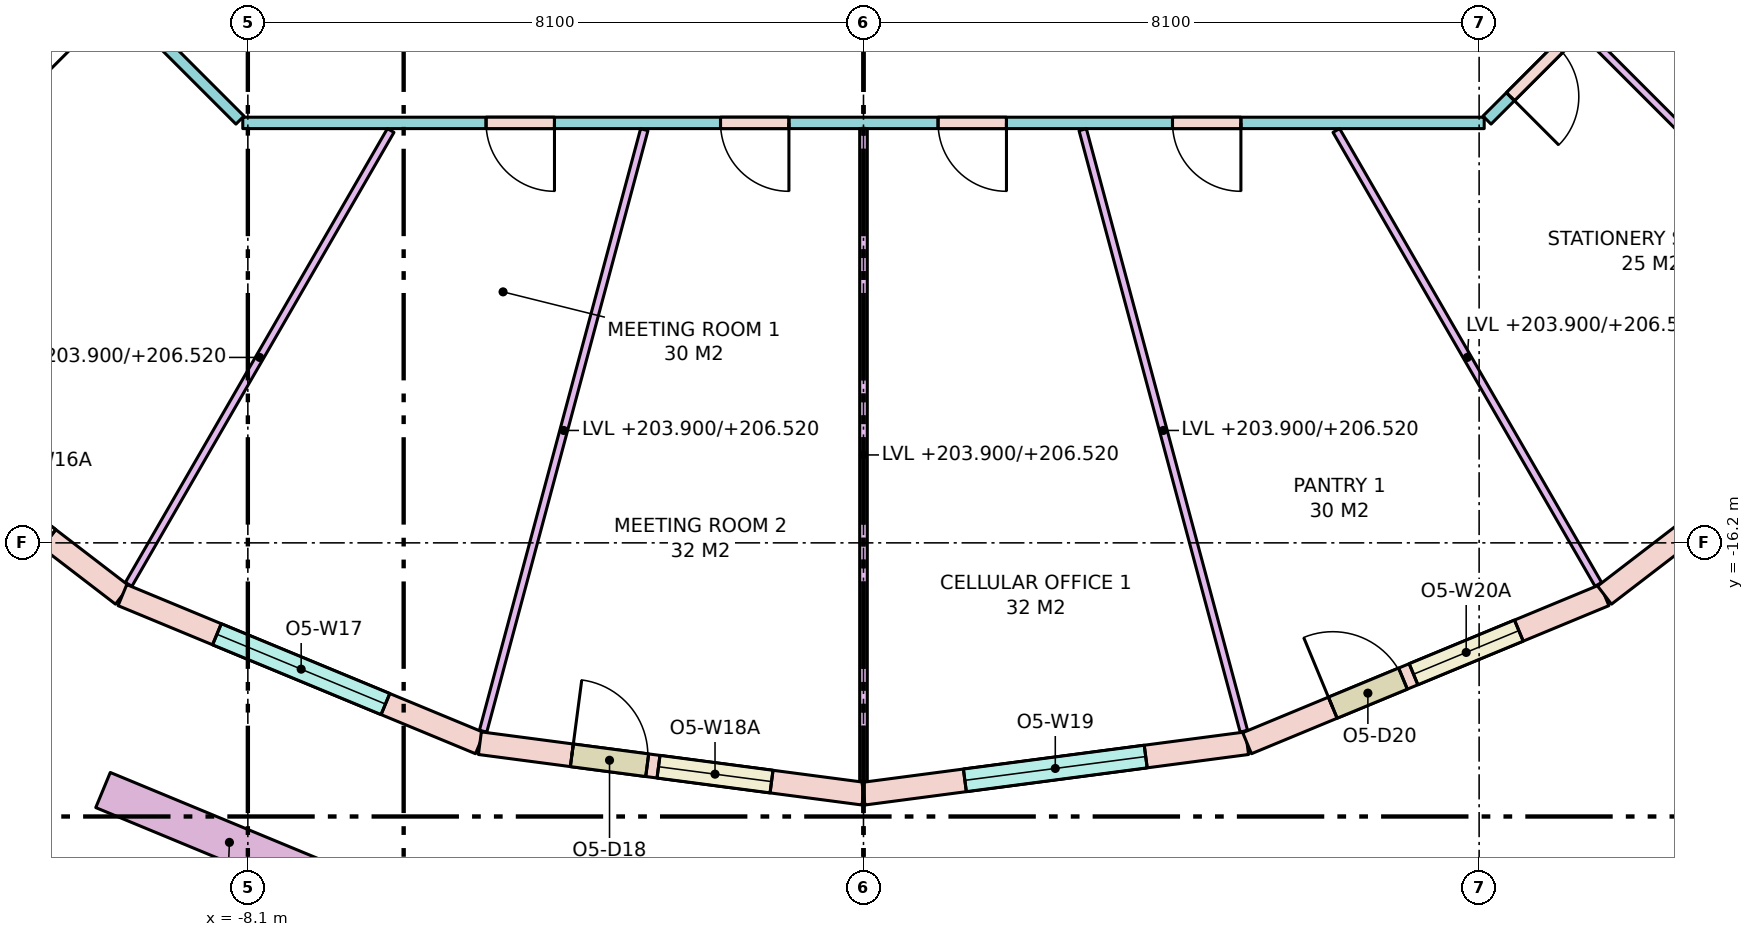
"""IFC4 building model, lengths in metres.
Left out: names, types, materials, properties, quantities, classifications, styles, units other than length and angle.
Written with IfcOpenShell. Run it as: python <this file> out.ifc"""

import sys

from ifc_helpers import new_model, si_unit, direction, frame, frame_2d, origin, place, context, subcontext, project, spatial, rectangle, extrude, element, fill, save


model = new_model("IFC4")
c1 = context("Model", 3, precision=1e-05, world=origin(), true_north=direction((0.0, 1.0)))
c2 = subcontext(c1, "Body", "Model", "MODEL_VIEW")
j1 = project(units=[si_unit("LENGTHUNIT", "METRE"), si_unit("PLANEANGLEUNIT", "RADIAN")], contexts=[c1])
p1 = place(None, origin())
s1 = spatial("IfcSite", under=j1, at=p1, CompositionType="ELEMENT")
p2 = place(p1, origin())
s2 = spatial("IfcBuilding", under=s1, at=p2, CompositionType="ELEMENT")
p3 = place(p2, frame((0.0, 0.0, 203.9)))
s3 = spatial("IfcBuildingStorey", under=s2, at=p3, CompositionType="ELEMENT", Elevation=203.9)
p4 = place(p3, frame((-13.789, -13.789, 0.0), z_axis=(0.0, 0.0, 1.0), x_axis=(0.79335619014, -0.608757714995, 0.0)))
e1 = element("IfcWall", 1, at=p4, inside=s3, PredefinedType="STANDARD", context=c2, shape_type="SweptSolid", body=[
    extrude(rectangle(XDim=5.091, YDim=0.3, at=frame_2d((2.545, 0.0))), origin(), (0.0, 0.0, 1.0), 3.42),
])
p5 = place(p4, frame((1.22, 0.0, 0.0)))
e2 = element("IfcOpeningElement", 2, at=p5, cuts=e1, PredefinedType="OPENING", context=c2, shape_type="SweptSolid", body=[
    extrude(rectangle(XDim=1.0, YDim=2.4, at=frame_2d((0.5, 1.2))), frame((0.0, 0.16, 0.0), z_axis=(0.0, -1.0, 0.0), x_axis=(1.0, 0.0, 0.0)), (0.0, 0.0, 1.0), 0.32),
])
p6 = place(p4, frame((2.37, 0.0, 0.8)))
e3 = element("IfcOpeningElement", 3, at=p6, cuts=e1, PredefinedType="OPENING", context=c2, shape_type="SweptSolid", body=[
    extrude(rectangle(XDim=1.5, YDim=2.4, at=frame_2d((0.75, 1.2))), frame((0.0, 0.16, 0.0), z_axis=(0.0, -1.0, 0.0), x_axis=(1.0, 0.0, 0.0)), (0.0, 0.0, 1.0), 0.32),
])
p7 = place(p3, frame((-9.75, -16.887, 0.0), z_axis=(0.0, 0.0, 1.0), x_axis=(0.923862504675, -0.382724538613, 0.0)))
e4 = element("IfcWall", 4, at=p7, inside=s3, PredefinedType="STANDARD", context=c2, shape_type="SweptSolid", body=[
    extrude(rectangle(XDim=5.091, YDim=0.3, at=frame_2d((2.545, 0.0))), origin(), (0.0, 0.0, 1.0), 3.42),
])
p8 = place(p7, frame((1.345, 0.0, 0.8)))
e5 = element("IfcOpeningElement", 5, at=p8, cuts=e4, PredefinedType="OPENING", context=c2, shape_type="SweptSolid", body=[
    extrude(rectangle(XDim=2.4, YDim=2.4, at=frame_2d((1.2, 1.2))), frame((0.0, 0.16, 0.0), z_axis=(0.0, -1.0, 0.0), x_axis=(1.0, 0.0, 0.0)), (0.0, 0.0, 1.0), 0.32),
])
p9 = place(p3, frame((-5.047, -18.836, 0.0), z_axis=(0.0, 0.0, 1.0), x_axis=(0.99144890792, -0.130495451964, 0.0)))
e6 = element("IfcWall", 6, at=p9, inside=s3, PredefinedType="STANDARD", context=c2, shape_type="SweptSolid", body=[
    extrude(rectangle(XDim=5.091, YDim=0.3, at=frame_2d((2.545, 0.0))), origin(), (0.0, 0.0, 1.0), 3.42),
])
p10 = place(p9, frame((1.22, 0.0, 0.0)))
e7 = element("IfcOpeningElement", 7, at=p10, cuts=e6, PredefinedType="OPENING", context=c2, shape_type="SweptSolid", body=[
    extrude(rectangle(XDim=1.0, YDim=2.4, at=frame_2d((0.5, 1.2))), frame((0.0, 0.16, 0.0), z_axis=(0.0, -1.0, 0.0), x_axis=(1.0, 0.0, 0.0)), (0.0, 0.0, 1.0), 0.32),
])
p11 = place(p9, frame((2.37, 0.0, 0.8)))
e8 = element("IfcOpeningElement", 8, at=p11, cuts=e6, PredefinedType="OPENING", context=c2, shape_type="SweptSolid", body=[
    extrude(rectangle(XDim=1.5, YDim=2.4, at=frame_2d((0.75, 1.2))), frame((0.0, 0.16, 0.0), z_axis=(0.0, -1.0, 0.0), x_axis=(1.0, 0.0, 0.0)), (0.0, 0.0, 1.0), 0.32),
])
p12 = place(p3, frame((0.0, -19.5, 0.0), z_axis=(0.0, 0.0, 1.0), x_axis=(0.99144890792, 0.130495451964, 0.0)))
e9 = element("IfcWall", 9, at=p12, inside=s3, PredefinedType="STANDARD", context=c2, shape_type="SweptSolid", body=[
    extrude(rectangle(XDim=5.091, YDim=0.3, at=frame_2d((2.545, 0.0))), origin(), (0.0, 0.0, 1.0), 3.42),
])
p13 = place(p12, frame((1.345, 0.0, 0.8)))
e10 = element("IfcOpeningElement", 10, at=p13, cuts=e9, PredefinedType="OPENING", context=c2, shape_type="SweptSolid", body=[
    extrude(rectangle(XDim=2.4, YDim=2.4, at=frame_2d((1.2, 1.2))), frame((0.0, 0.16, 0.0), z_axis=(0.0, -1.0, 0.0), x_axis=(1.0, 0.0, 0.0)), (0.0, 0.0, 1.0), 0.32),
])
p14 = place(p3, frame((5.047, -18.836, 0.0), z_axis=(0.0, 0.0, 1.0), x_axis=(0.923862504675, 0.382724538613, 0.0)))
e11 = element("IfcWall", 11, at=p14, inside=s3, PredefinedType="STANDARD", context=c2, shape_type="SweptSolid", body=[
    extrude(rectangle(XDim=5.091, YDim=0.3, at=frame_2d((2.545, 0.0))), origin(), (0.0, 0.0, 1.0), 3.42),
])
p15 = place(p14, frame((1.22, 0.0, 0.0)))
e12 = element("IfcOpeningElement", 12, at=p15, cuts=e11, PredefinedType="OPENING", context=c2, shape_type="SweptSolid", body=[
    extrude(rectangle(XDim=1.0, YDim=2.4, at=frame_2d((0.5, 1.2))), frame((0.0, 0.16, 0.0), z_axis=(0.0, -1.0, 0.0), x_axis=(1.0, 0.0, 0.0)), (0.0, 0.0, 1.0), 0.32),
])
p16 = place(p14, frame((2.37, 0.0, 0.8)))
e13 = element("IfcOpeningElement", 13, at=p16, cuts=e11, PredefinedType="OPENING", context=c2, shape_type="SweptSolid", body=[
    extrude(rectangle(XDim=1.5, YDim=2.4, at=frame_2d((0.75, 1.2))), frame((0.0, 0.16, 0.0), z_axis=(0.0, -1.0, 0.0), x_axis=(1.0, 0.0, 0.0)), (0.0, 0.0, 1.0), 0.32),
])
p17 = place(p3, frame((9.75, -16.887, 0.0), z_axis=(0.0, 0.0, 1.0), x_axis=(0.79335619014, 0.608757714995, 0.0)))
e14 = element("IfcWall", 14, at=p17, inside=s3, PredefinedType="STANDARD", context=c2, shape_type="SweptSolid", body=[
    extrude(rectangle(XDim=5.091, YDim=0.3, at=frame_2d((2.545, 0.0))), origin(), (0.0, 0.0, 1.0), 3.42),
])
p18 = place(p17, frame((1.345, 0.0, 0.8)))
e15 = element("IfcOpeningElement", 15, at=p18, cuts=e14, PredefinedType="OPENING", context=c2, shape_type="SweptSolid", body=[
    extrude(rectangle(XDim=2.4, YDim=2.4, at=frame_2d((1.2, 1.2))), frame((0.0, 0.16, 0.0), z_axis=(0.0, -1.0, 0.0), x_axis=(1.0, 0.0, 0.0)), (0.0, 0.0, 1.0), 0.32),
])
p19 = place(p3, frame((-10.006, -19.452, 0.0), z_axis=(0.0, 0.0, 1.0), x_axis=(0.923885420167, -0.382669217998, 0.0)))
e16 = element("IfcWall", 16, at=p19, inside=s3, PredefinedType="PARAPET", context=c2, shape_type="SweptSolid", body=[
    extrude(rectangle(XDim=3.6, YDim=0.5, at=frame_2d((1.8, 0.0))), origin(), (0.0, 0.0, 1.0), 0.9),
])
p20 = place(p3, frame((12.638, -6.204, 0.0), z_axis=(0.0, 0.0, 1.0), x_axis=(-0.707106781187, -0.707106781187, 0.0)))
e17 = element("IfcWall", 17, at=p20, inside=s3, PredefinedType="PARTITIONING", context=c2, shape_type="SweptSolid", body=[
    extrude(rectangle(XDim=6.271, YDim=0.15, at=frame_2d((3.135, 0.0))), origin(), (0.0, 0.0, 1.0), 2.62),
])
p21 = place(p20, frame((4.935, 0.0, 0.0)))
e18 = element("IfcOpeningElement", 18, at=p21, cuts=e17, PredefinedType="OPENING", context=c2, shape_type="SweptSolid", body=[
    extrude(rectangle(XDim=0.9, YDim=2.1, at=frame_2d((0.45, 1.05))), frame((0.0, 0.085, 0.0), z_axis=(0.0, -1.0, 0.0), x_axis=(1.0, 0.0, 0.0)), (0.0, 0.0, 1.0), 0.17),
])
p22 = place(p20, frame((2.314, 0.0, 0.0)))
e19 = element("IfcOpeningElement", 19, at=p22, cuts=e17, PredefinedType="OPENING", context=c2, shape_type="SweptSolid", body=[
    extrude(rectangle(XDim=0.9, YDim=2.1, at=frame_2d((0.45, 1.05))), frame((0.0, 0.085, 0.0), z_axis=(0.0, -1.0, 0.0), x_axis=(1.0, 0.0, 0.0)), (0.0, 0.0, 1.0), 0.17),
])
p23 = place(p3, frame((8.167, -10.675, 0.0), z_axis=(0.0, 0.0, 1.0), x_axis=(-1.0, 0.0, 0.0)))
e20 = element("IfcWall", 20, at=p23, inside=s3, PredefinedType="PARTITIONING", context=c2, shape_type="SweptSolid", body=[
    extrude(rectangle(XDim=16.333, YDim=0.15, at=frame_2d((8.167, 0.0))), origin(), (0.0, 0.0, 1.0), 2.62),
])
p24 = place(p23, frame((12.232, 0.0, 0.0)))
e21 = element("IfcOpeningElement", 21, at=p24, cuts=e20, PredefinedType="OPENING", context=c2, shape_type="SweptSolid", body=[
    extrude(rectangle(XDim=0.9, YDim=2.1, at=frame_2d((0.45, 1.05))), frame((0.0, 0.085, 0.0), z_axis=(0.0, -1.0, 0.0), x_axis=(1.0, 0.0, 0.0)), (0.0, 0.0, 1.0), 0.17),
])
p25 = place(p23, frame((9.148, 0.0, 0.0)))
e22 = element("IfcOpeningElement", 22, at=p25, cuts=e20, PredefinedType="OPENING", context=c2, shape_type="SweptSolid", body=[
    extrude(rectangle(XDim=0.9, YDim=2.1, at=frame_2d((0.45, 1.05))), frame((0.0, 0.085, 0.0), z_axis=(0.0, -1.0, 0.0), x_axis=(1.0, 0.0, 0.0)), (0.0, 0.0, 1.0), 0.17),
])
p26 = place(p23, frame((6.285, 0.0, 0.0)))
e23 = element("IfcOpeningElement", 23, at=p26, cuts=e20, PredefinedType="OPENING", context=c2, shape_type="SweptSolid", body=[
    extrude(rectangle(XDim=0.9, YDim=2.1, at=frame_2d((0.45, 1.05))), frame((0.0, 0.085, 0.0), z_axis=(0.0, -1.0, 0.0), x_axis=(1.0, 0.0, 0.0)), (0.0, 0.0, 1.0), 0.17),
])
p27 = place(p23, frame((3.201, 0.0, 0.0)))
e24 = element("IfcOpeningElement", 24, at=p27, cuts=e20, PredefinedType="OPENING", context=c2, shape_type="SweptSolid", body=[
    extrude(rectangle(XDim=0.9, YDim=2.1, at=frame_2d((0.45, 1.05))), frame((0.0, 0.085, 0.0), z_axis=(0.0, -1.0, 0.0), x_axis=(1.0, 0.0, 0.0)), (0.0, 0.0, 1.0), 0.17),
])
p28 = place(p3, frame((-8.204, -10.638, 0.0), z_axis=(0.0, 0.0, 1.0), x_axis=(-0.707106781187, 0.707106781187, 0.0)))
e25 = element("IfcWall", 25, at=p28, inside=s3, PredefinedType="PARTITIONING", context=c2, shape_type="SweptSolid", body=[
    extrude(rectangle(XDim=6.271, YDim=0.15, at=frame_2d((3.135, 0.0))), origin(), (0.0, 0.0, 1.0), 2.62),
])
p29 = place(p28, frame((2.235, 0.0, 0.0)))
e26 = element("IfcOpeningElement", 26, at=p29, cuts=e25, PredefinedType="OPENING", context=c2, shape_type="SweptSolid", body=[
    extrude(rectangle(XDim=1.8, YDim=2.1, at=frame_2d((0.9, 1.05))), frame((0.0, 0.085, 0.0), z_axis=(0.0, -1.0, 0.0), x_axis=(1.0, 0.0, 0.0)), (0.0, 0.0, 1.0), 0.17),
])
p30 = place(p3, frame((-6.221, -10.775, 0.0), z_axis=(0.0, 0.0, 1.0), x_axis=(-0.500015661236, -0.866016361577, 0.0)))
e27 = element("IfcWall", 27, at=p30, inside=s3, PredefinedType="PARTITIONING", context=c2, shape_type="SweptSolid", body=[
    extrude(rectangle(XDim=6.895, YDim=0.1, at=frame_2d((3.448, 0.0))), origin(), (0.0, 0.0, 1.0), 2.62),
])
p31 = place(p3, frame((-2.884, -10.764, 0.0), z_axis=(0.0, 0.0, 1.0), x_axis=(-0.258818011497, -0.965926103242, 0.0)))
e28 = element("IfcWall", 28, at=p31, inside=s3, PredefinedType="PARTITIONING", context=c2, shape_type="SweptSolid", body=[
    extrude(rectangle(XDim=8.192, YDim=0.1, at=frame_2d((4.096, 0.0))), origin(), (0.0, 0.0, 1.0), 2.62),
])
p32 = place(p3, frame((0.0, -10.75, 0.0), z_axis=(0.0, 0.0, 1.0), x_axis=(0.0, -1.0, 0.0)))
e29 = element("IfcWall", 29, at=p32, inside=s3, PredefinedType="PARTITIONING", context=c2, shape_type="SweptSolid", body=[
    extrude(rectangle(XDim=8.587, YDim=0.1, at=frame_2d((4.293, 0.0))), origin(), (0.0, 0.0, 1.0), 2.62),
])
p33 = place(p3, frame((2.884, -10.764, 0.0), z_axis=(0.0, 0.0, 1.0), x_axis=(0.258818011497, -0.965926103242, 0.0)))
e30 = element("IfcWall", 30, at=p33, inside=s3, PredefinedType="PARTITIONING", context=c2, shape_type="SweptSolid", body=[
    extrude(rectangle(XDim=8.192, YDim=0.1, at=frame_2d((4.096, 0.0))), origin(), (0.0, 0.0, 1.0), 2.62),
])
p34 = place(p3, frame((6.221, -10.775, 0.0), z_axis=(0.0, 0.0, 1.0), x_axis=(0.500015661236, -0.866016361577, 0.0)))
e31 = element("IfcWall", 31, at=p34, inside=s3, PredefinedType="PARTITIONING", context=c2, shape_type="SweptSolid", body=[
    extrude(rectangle(XDim=6.895, YDim=0.1, at=frame_2d((3.448, 0.0))), origin(), (0.0, 0.0, 1.0), 2.62),
])
p35 = place(p3, frame((9.474, -9.474, 0.0), z_axis=(0.0, 0.0, 1.0), x_axis=(0.707106781187, -0.707106781187, 0.0)))
e32 = element("IfcWall", 32, at=p35, inside=s3, PredefinedType="PARTITIONING", context=c2, shape_type="SweptSolid", body=[
    extrude(rectangle(XDim=5.938, YDim=0.1, at=frame_2d((2.969, 0.0))), origin(), (0.0, 0.0, 1.0), 2.62),
])
p36 = place(p8, origin())
e33 = element("IfcWindow", 33, at=p36, inside=s3, PartitioningType="SINGLE_PANEL", PredefinedType="WINDOW", context=c2, shape_type="SweptSolid", body=[
    extrude(rectangle(XDim=2.4, YDim=2.4, at=frame_2d((1.2, 1.2))), frame((0.0, 0.03, 0.0), z_axis=(0.0, -1.0, 0.0), x_axis=(1.0, 0.0, 0.0)), (0.0, 0.0, 1.0), 0.06),
])
fill(e5, e33)
p37 = place(p10, origin())
e34 = element("IfcDoor", 34, at=p37, inside=s3, OperationType="SINGLE_SWING_LEFT", PredefinedType="DOOR", context=c2, shape_type="SweptSolid", body=[
    extrude(rectangle(XDim=1.0, YDim=2.4, at=frame_2d((0.5, 1.2))), frame((0.0, 0.025, 0.0), z_axis=(0.0, -1.0, 0.0), x_axis=(1.0, 0.0, 0.0)), (0.0, 0.0, 1.0), 0.05),
])
fill(e7, e34)
p38 = place(p11, origin())
e35 = element("IfcWindow", 35, at=p38, inside=s3, PartitioningType="SINGLE_PANEL", PredefinedType="WINDOW", context=c2, shape_type="SweptSolid", body=[
    extrude(rectangle(XDim=1.5, YDim=2.4, at=frame_2d((0.75, 1.2))), frame((0.0, 0.03, 0.0), z_axis=(0.0, -1.0, 0.0), x_axis=(1.0, 0.0, 0.0)), (0.0, 0.0, 1.0), 0.06),
])
fill(e8, e35)
p39 = place(p13, origin())
e36 = element("IfcWindow", 36, at=p39, inside=s3, PartitioningType="SINGLE_PANEL", PredefinedType="WINDOW", context=c2, shape_type="SweptSolid", body=[
    extrude(rectangle(XDim=2.4, YDim=2.4, at=frame_2d((1.2, 1.2))), frame((0.0, 0.03, 0.0), z_axis=(0.0, -1.0, 0.0), x_axis=(1.0, 0.0, 0.0)), (0.0, 0.0, 1.0), 0.06),
])
fill(e10, e36)
p40 = place(p15, origin())
e37 = element("IfcDoor", 37, at=p40, inside=s3, OperationType="SINGLE_SWING_LEFT", PredefinedType="DOOR", context=c2, shape_type="SweptSolid", body=[
    extrude(rectangle(XDim=1.0, YDim=2.4, at=frame_2d((0.5, 1.2))), frame((0.0, 0.025, 0.0), z_axis=(0.0, -1.0, 0.0), x_axis=(1.0, 0.0, 0.0)), (0.0, 0.0, 1.0), 0.05),
])
fill(e12, e37)
p41 = place(p16, origin())
e38 = element("IfcWindow", 38, at=p41, inside=s3, PartitioningType="SINGLE_PANEL", PredefinedType="WINDOW", context=c2, shape_type="SweptSolid", body=[
    extrude(rectangle(XDim=1.5, YDim=2.4, at=frame_2d((0.75, 1.2))), frame((0.0, 0.03, 0.0), z_axis=(0.0, -1.0, 0.0), x_axis=(1.0, 0.0, 0.0)), (0.0, 0.0, 1.0), 0.06),
])
fill(e13, e38)
p42 = place(p24, origin())
e39 = element("IfcDoor", 39, at=p42, inside=s3, OperationType="SINGLE_SWING_LEFT", PredefinedType="DOOR", context=c2, shape_type="SweptSolid", body=[
    extrude(rectangle(XDim=0.9, YDim=2.1, at=frame_2d((0.45, 1.05))), frame((0.0, 0.025, 0.0), z_axis=(0.0, -1.0, 0.0), x_axis=(1.0, 0.0, 0.0)), (0.0, 0.0, 1.0), 0.05),
])
fill(e21, e39)
p43 = place(p25, origin())
e40 = element("IfcDoor", 40, at=p43, inside=s3, OperationType="SINGLE_SWING_LEFT", PredefinedType="DOOR", context=c2, shape_type="SweptSolid", body=[
    extrude(rectangle(XDim=0.9, YDim=2.1, at=frame_2d((0.45, 1.05))), frame((0.0, 0.025, 0.0), z_axis=(0.0, -1.0, 0.0), x_axis=(1.0, 0.0, 0.0)), (0.0, 0.0, 1.0), 0.05),
])
fill(e22, e40)
p44 = place(p26, origin())
e41 = element("IfcDoor", 41, at=p44, inside=s3, OperationType="SINGLE_SWING_LEFT", PredefinedType="DOOR", context=c2, shape_type="SweptSolid", body=[
    extrude(rectangle(XDim=0.9, YDim=2.1, at=frame_2d((0.45, 1.05))), frame((0.0, 0.025, 0.0), z_axis=(0.0, -1.0, 0.0), x_axis=(1.0, 0.0, 0.0)), (0.0, 0.0, 1.0), 0.05),
])
fill(e23, e41)
p45 = place(p27, origin())
e42 = element("IfcDoor", 42, at=p45, inside=s3, OperationType="SINGLE_SWING_LEFT", PredefinedType="DOOR", context=c2, shape_type="SweptSolid", body=[
    extrude(rectangle(XDim=0.9, YDim=2.1, at=frame_2d((0.45, 1.05))), frame((0.0, 0.025, 0.0), z_axis=(0.0, -1.0, 0.0), x_axis=(1.0, 0.0, 0.0)), (0.0, 0.0, 1.0), 0.05),
])
fill(e24, e42)
p46 = place(p21, origin())
e43 = element("IfcDoor", 43, at=p46, inside=s3, OperationType="SINGLE_SWING_RIGHT", PredefinedType="DOOR", context=c2, shape_type="SweptSolid", body=[
    extrude(rectangle(XDim=0.9, YDim=2.1, at=frame_2d((0.45, 1.05))), frame((0.0, 0.025, 0.0), z_axis=(0.0, -1.0, 0.0), x_axis=(1.0, 0.0, 0.0)), (0.0, 0.0, 1.0), 0.05),
])
fill(e18, e43)
save(model, sys.argv[1])
